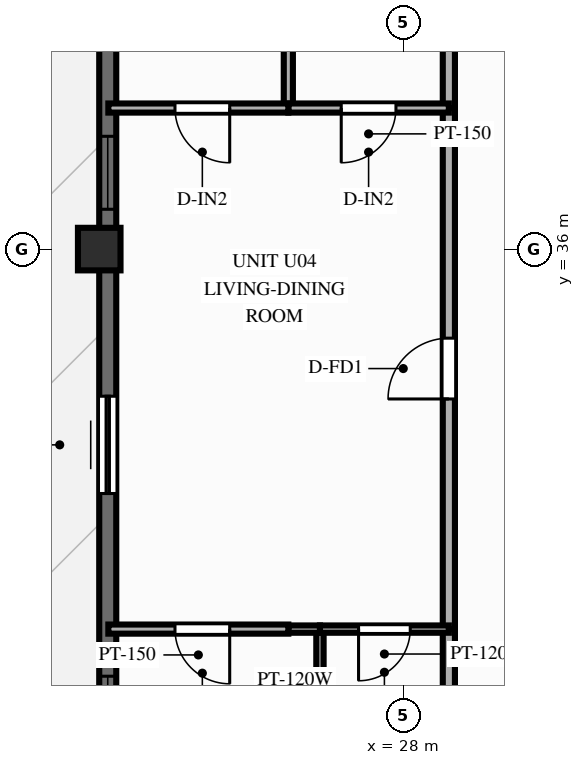
"""IFC4 building model, lengths in metres.
Left out: names, types, materials, properties, quantities, classifications, styles, units other than length and angle.
Written with IfcOpenShell. Run it as: python <this file> out.ifc"""

import sys

from ifc_helpers import new_model, si_unit, direction, frame, frame_2d, origin, origin_2d, place, context, subcontext, project, spatial, rectangle, extrude, source, transform, mapped, element, fill, save


model = new_model("IFC4")
c1 = context("Model", 3, precision=1e-05, world=origin(), true_north=direction((0.0, 1.0)))
c2 = subcontext(c1, "Body", "Model", "MODEL_VIEW")
j1 = project(units=[si_unit("LENGTHUNIT", "METRE"), si_unit("PLANEANGLEUNIT", "RADIAN")], contexts=[c1])
p1 = place(None, origin())
s1 = spatial("IfcSite", under=j1, at=p1, CompositionType="ELEMENT")
p2 = place(p1, origin())
s2 = spatial("IfcBuilding", under=s1, at=p2, CompositionType="ELEMENT")
p3 = place(p2, frame((0.0, 0.0, 240.0)))
s3 = spatial("IfcBuildingStorey", under=s2, at=p3, CompositionType="ELEMENT", Elevation=240.0)
m1 = source(origin(), c2, "Body", "SweptSolid", [
    extrude(rectangle(XDim=0.7, YDim=0.7, at=origin_2d()), origin(), (0.0, 0.0, 1.0), 3.0),
])
p4 = place(p3, frame((23.0, 36.0, 0.0), z_axis=(0.0, 0.0, 1.0), x_axis=(1.0, 0.0, 0.0)))
e1 = element("IfcColumn", 1, at=p4, inside=s3, PredefinedType="COLUMN", context=c2, shape_type="MappedRepresentation", body=[
    mapped(m1, transform((0.0, 0.0, 0.0), scale=1.0)),
])
p5 = place(p3, frame((23.14, 11.5, 0.0), z_axis=(0.0, 0.0, 1.0), x_axis=(0.0, 1.0, 0.0)))
e2 = element("IfcWall", 2, at=p5, inside=s3, PredefinedType="SOLIDWALL", context=c2, shape_type="SweptSolid", body=[
    extrude(rectangle(XDim=31.0, YDim=0.28, at=frame_2d((15.5, 0.0))), origin(), (0.0, 0.0, 1.0), 2.28),
])
p6 = place(p5, frame((1.577, 0.0, 0.25)))
e3 = element("IfcOpeningElement", 3, at=p6, cuts=e2, PredefinedType="OPENING", context=c2, shape_type="SweptSolid", body=[
    extrude(rectangle(XDim=1.2, YDim=1.5, at=frame_2d((0.6, 0.75))), frame((0.0, 0.152, 0.0), z_axis=(0.0, -1.0, 0.0), x_axis=(1.0, 0.0, 0.0)), (0.0, 0.0, 1.0), 0.304),
])
p7 = place(p5, frame((4.637, 0.0, 0.25)))
e4 = element("IfcOpeningElement", 4, at=p7, cuts=e2, PredefinedType="OPENING", context=c2, shape_type="SweptSolid", body=[
    extrude(rectangle(XDim=1.2, YDim=1.5, at=frame_2d((0.6, 0.75))), frame((0.0, 0.152, 0.0), z_axis=(0.0, -1.0, 0.0), x_axis=(1.0, 0.0, 0.0)), (0.0, 0.0, 1.0), 0.304),
])
p8 = place(p5, frame((8.495, 0.0, 0.25)))
e5 = element("IfcOpeningElement", 5, at=p8, cuts=e2, PredefinedType="OPENING", context=c2, shape_type="SweptSolid", body=[
    extrude(rectangle(XDim=1.2, YDim=1.5, at=frame_2d((0.6, 0.75))), frame((0.0, 0.152, 0.0), z_axis=(0.0, -1.0, 0.0), x_axis=(1.0, 0.0, 0.0)), (0.0, 0.0, 1.0), 0.304),
])
p9 = place(p5, frame((12.9, 0.0, 0.25)))
e6 = element("IfcOpeningElement", 6, at=p9, cuts=e2, PredefinedType="OPENING", context=c2, shape_type="SweptSolid", body=[
    extrude(rectangle(XDim=1.2, YDim=1.5, at=frame_2d((0.6, 0.75))), frame((0.0, 0.152, 0.0), z_axis=(0.0, -1.0, 0.0), x_axis=(1.0, 0.0, 0.0)), (0.0, 0.0, 1.0), 0.304),
])
p10 = place(p5, frame((16.275, 0.0, 0.25)))
e7 = element("IfcOpeningElement", 7, at=p10, cuts=e2, PredefinedType="OPENING", context=c2, shape_type="SweptSolid", body=[
    extrude(rectangle(XDim=1.2, YDim=1.5, at=frame_2d((0.6, 0.75))), frame((0.0, 0.152, 0.0), z_axis=(0.0, -1.0, 0.0), x_axis=(1.0, 0.0, 0.0)), (0.0, 0.0, 1.0), 0.304),
])
p11 = place(p5, frame((20.48, 0.0, 0.0)))
e8 = element("IfcOpeningElement", 8, at=p11, cuts=e2, PredefinedType="OPENING", context=c2, shape_type="SweptSolid", body=[
    extrude(rectangle(XDim=1.6, YDim=2.15, at=frame_2d((0.8, 1.075))), frame((0.0, 0.152, 0.0), z_axis=(0.0, -1.0, 0.0), x_axis=(1.0, 0.0, 0.0)), (0.0, 0.0, 1.0), 0.304),
])
p12 = place(p5, frame((25.155, 0.0, 0.25)))
e9 = element("IfcOpeningElement", 9, at=p12, cuts=e2, PredefinedType="OPENING", context=c2, shape_type="SweptSolid", body=[
    extrude(rectangle(XDim=1.2, YDim=1.5, at=frame_2d((0.6, 0.75))), frame((0.0, 0.152, 0.0), z_axis=(0.0, -1.0, 0.0), x_axis=(1.0, 0.0, 0.0)), (0.0, 0.0, 1.0), 0.304),
])
p13 = place(p5, frame((28.215, 0.0, 0.25)))
e10 = element("IfcOpeningElement", 10, at=p13, cuts=e2, PredefinedType="OPENING", context=c2, shape_type="SweptSolid", body=[
    extrude(rectangle(XDim=1.2, YDim=1.5, at=frame_2d((0.6, 0.75))), frame((0.0, 0.152, 0.0), z_axis=(0.0, -1.0, 0.0), x_axis=(1.0, 0.0, 0.0)), (0.0, 0.0, 1.0), 0.304),
])
p14 = place(p3, frame((28.75, 27.0, 0.0), z_axis=(0.0, 0.0, 1.0), x_axis=(0.0, 1.0, 0.0)))
e11 = element("IfcWall", 11, at=p14, inside=s3, PredefinedType="PARTITIONING", context=c2, shape_type="SweptSolid", body=[
    extrude(rectangle(XDim=2.75, YDim=0.2, at=frame_2d((1.375, 0.0))), origin(), (0.0, 0.0, 1.0), 2.79),
])
p15 = place(p3, frame((28.75, 29.75, 0.0), z_axis=(0.0, 0.0, 1.0), x_axis=(0.0, 1.0, 0.0)))
e12 = element("IfcWall", 12, at=p15, inside=s3, PredefinedType="PARTITIONING", context=c2, shape_type="SweptSolid", body=[
    extrude(rectangle(XDim=8.57, YDim=0.2, at=frame_2d((4.285, 0.0))), origin(), (0.0, 0.0, 1.0), 2.79),
])
p16 = place(p15, frame((3.785, 0.0, 0.0)))
e13 = element("IfcOpeningElement", 13, at=p16, cuts=e12, PredefinedType="OPENING", context=c2, shape_type="SweptSolid", body=[
    extrude(rectangle(XDim=1.0, YDim=2.15, at=frame_2d((0.5, 1.075))), frame((0.0, 0.112, 0.0), z_axis=(0.0, -1.0, 0.0), x_axis=(1.0, 0.0, 0.0)), (0.0, 0.0, 1.0), 0.224),
])
p17 = place(p3, frame((28.75, 38.32, 0.0), z_axis=(0.0, 0.0, 1.0), x_axis=(0.0, 1.0, 0.0)))
e14 = element("IfcWall", 14, at=p17, inside=s3, PredefinedType="PARTITIONING", context=c2, shape_type="SweptSolid", body=[
    extrude(rectangle(XDim=4.0, YDim=0.2, at=frame_2d((2.0, 0.0))), origin(), (0.0, 0.0, 1.0), 2.79),
])
p18 = place(p3, frame((26.63, 27.0, 0.0), z_axis=(0.0, 0.0, 1.0), x_axis=(0.0, 1.0, 0.0)))
e15 = element("IfcWall", 15, at=p18, inside=s3, PredefinedType="PARTITIONING", context=c2, shape_type="SweptSolid", body=[
    extrude(rectangle(XDim=2.75, YDim=0.12, at=frame_2d((1.375, 0.0))), origin(), (0.0, 0.0, 1.0), 2.49),
])
p19 = place(p3, frame((26.11, 38.32, 0.0), z_axis=(0.0, 0.0, 1.0), x_axis=(0.0, 1.0, 0.0)))
e16 = element("IfcWall", 16, at=p19, inside=s3, PredefinedType="PARTITIONING", context=c2, shape_type="SweptSolid", body=[
    extrude(rectangle(XDim=4.0, YDim=0.15, at=frame_2d((2.0, 0.0))), origin(), (0.0, 0.0, 1.0), 2.79),
])
p20 = place(p3, frame((28.75, 29.75, 0.0), z_axis=(0.0, 0.0, 1.0), x_axis=(-1.0, 0.0, 0.0)))
e17 = element("IfcWall", 17, at=p20, inside=s3, PredefinedType="PARTITIONING", context=c2, shape_type="SweptSolid", body=[
    extrude(rectangle(XDim=2.12, YDim=0.12, at=frame_2d((1.06, 0.0))), origin(), (0.0, 0.0, 1.0), 2.79),
])
p21 = place(p20, frame((0.635, 0.0, 0.0)))
e18 = element("IfcOpeningElement", 18, at=p21, cuts=e17, PredefinedType="OPENING", context=c2, shape_type="SweptSolid", body=[
    extrude(rectangle(XDim=0.85, YDim=2.05, at=frame_2d((0.425, 1.025))), frame((0.0, 0.072, 0.0), z_axis=(0.0, -1.0, 0.0), x_axis=(1.0, 0.0, 0.0)), (0.0, 0.0, 1.0), 0.144),
])
p22 = place(p3, frame((26.63, 29.75, 0.0), z_axis=(0.0, 0.0, 1.0), x_axis=(-1.0, 0.0, 0.0)))
e19 = element("IfcWall", 19, at=p22, inside=s3, PredefinedType="PARTITIONING", context=c2, shape_type="SweptSolid", body=[
    extrude(rectangle(XDim=0.52, YDim=0.12, at=frame_2d((0.26, 0.0))), origin(), (0.0, 0.0, 1.0), 2.79),
])
p23 = place(p3, frame((26.11, 29.75, 0.0), z_axis=(0.0, 0.0, 1.0), x_axis=(-1.0, 0.0, 0.0)))
e20 = element("IfcWall", 20, at=p23, inside=s3, PredefinedType="PARTITIONING", context=c2, shape_type="SweptSolid", body=[
    extrude(rectangle(XDim=2.96, YDim=0.15, at=frame_2d((1.48, 0.0))), origin(), (0.0, 0.0, 1.0), 2.79),
])
p24 = place(p23, frame((0.964, 0.0, 0.0)))
e21 = element("IfcOpeningElement", 21, at=p24, cuts=e20, PredefinedType="OPENING", context=c2, shape_type="SweptSolid", body=[
    extrude(rectangle(XDim=0.9, YDim=2.1, at=frame_2d((0.45, 1.05))), frame((0.0, 0.087, 0.0), z_axis=(0.0, -1.0, 0.0), x_axis=(1.0, 0.0, 0.0)), (0.0, 0.0, 1.0), 0.174),
])
p25 = place(p3, frame((28.75, 38.32, 0.0), z_axis=(0.0, 0.0, 1.0), x_axis=(-1.0, 0.0, 0.0)))
e22 = element("IfcWall", 22, at=p25, inside=s3, PredefinedType="PARTITIONING", context=c2, shape_type="SweptSolid", body=[
    extrude(rectangle(XDim=2.64, YDim=0.15, at=frame_2d((1.32, 0.0))), origin(), (0.0, 0.0, 1.0), 2.79),
])
p26 = place(p25, frame((0.87, 0.0, 0.0)))
e23 = element("IfcOpeningElement", 23, at=p26, cuts=e22, PredefinedType="OPENING", context=c2, shape_type="SweptSolid", body=[
    extrude(rectangle(XDim=0.9, YDim=2.1, at=frame_2d((0.45, 1.05))), frame((0.0, 0.087, 0.0), z_axis=(0.0, -1.0, 0.0), x_axis=(1.0, 0.0, 0.0)), (0.0, 0.0, 1.0), 0.174),
])
p27 = place(p3, frame((26.11, 38.32, 0.0), z_axis=(0.0, 0.0, 1.0), x_axis=(-1.0, 0.0, 0.0)))
e24 = element("IfcWall", 24, at=p27, inside=s3, PredefinedType="PARTITIONING", context=c2, shape_type="SweptSolid", body=[
    extrude(rectangle(XDim=2.96, YDim=0.15, at=frame_2d((1.48, 0.0))), origin(), (0.0, 0.0, 1.0), 2.79),
])
p28 = place(p27, frame((0.964, 0.0, 0.0)))
e25 = element("IfcOpeningElement", 25, at=p28, cuts=e24, PredefinedType="OPENING", context=c2, shape_type="SweptSolid", body=[
    extrude(rectangle(XDim=0.9, YDim=2.1, at=frame_2d((0.45, 1.05))), frame((0.0, 0.087, 0.0), z_axis=(0.0, -1.0, 0.0), x_axis=(1.0, 0.0, 0.0)), (0.0, 0.0, 1.0), 0.174),
])
m2 = source(origin(), c2, "Body", "SweptSolid", [
    extrude(rectangle(XDim=1.2, YDim=1.5, at=frame_2d((0.6, 0.75))), frame((0.0, 0.03, 0.0), z_axis=(0.0, -1.0, 0.0), x_axis=(1.0, 0.0, 0.0)), (0.0, 0.0, 1.0), 0.06),
])
p29 = place(p10, origin())
e26 = element("IfcWindow", 26, at=p29, inside=s3, PartitioningType="SINGLE_PANEL", PredefinedType="WINDOW", context=c2, shape_type="MappedRepresentation", body=[
    mapped(m2, transform((0.0, 0.0, 0.0), scale=1.0)),
])
fill(e7, e26)
m3 = source(origin(), c2, "Body", "SweptSolid", [
    extrude(rectangle(XDim=1.6, YDim=2.15, at=frame_2d((0.8, 1.075))), frame((0.0, 0.025, 0.0), z_axis=(0.0, -1.0, 0.0), x_axis=(1.0, 0.0, 0.0)), (0.0, 0.0, 1.0), 0.05),
])
p30 = place(p11, origin())
e27 = element("IfcDoor", 27, at=p30, inside=s3, OperationType="SLIDING_TO_LEFT", PredefinedType="DOOR", context=c2, shape_type="MappedRepresentation", body=[
    mapped(m3, transform((0.0, 0.0, 0.0), scale=1.0)),
])
fill(e8, e27)
p31 = place(p12, origin())
e28 = element("IfcWindow", 28, at=p31, inside=s3, PartitioningType="SINGLE_PANEL", PredefinedType="WINDOW", context=c2, shape_type="MappedRepresentation", body=[
    mapped(m2, transform((0.0, 0.0, 0.0), scale=1.0)),
])
fill(e9, e28)
m4 = source(origin(), c2, "Body", "SweptSolid", [
    extrude(rectangle(XDim=1.0, YDim=2.15, at=frame_2d((0.5, 1.075))), frame((0.0, 0.025, 0.0), z_axis=(0.0, -1.0, 0.0), x_axis=(1.0, 0.0, 0.0)), (0.0, 0.0, 1.0), 0.05),
])
p32 = place(p16, origin())
e29 = element("IfcDoor", 29, at=p32, inside=s3, OperationType="SINGLE_SWING_LEFT", PredefinedType="DOOR", context=c2, shape_type="MappedRepresentation", body=[
    mapped(m4, transform((0.0, 0.0, 0.0), scale=1.0)),
])
fill(e13, e29)
m5 = source(origin(), c2, "Body", "SweptSolid", [
    extrude(rectangle(XDim=0.85, YDim=2.05, at=frame_2d((0.425, 1.025))), frame((0.0, 0.025, 0.0), z_axis=(0.0, -1.0, 0.0), x_axis=(1.0, 0.0, 0.0)), (0.0, 0.0, 1.0), 0.05),
])
p33 = place(p21, origin())
e30 = element("IfcDoor", 30, at=p33, inside=s3, OperationType="SINGLE_SWING_RIGHT", PredefinedType="DOOR", context=c2, shape_type="MappedRepresentation", body=[
    mapped(m5, transform((0.0, 0.0, 0.0), scale=1.0)),
])
fill(e18, e30)
m6 = source(origin(), c2, "Body", "SweptSolid", [
    extrude(rectangle(XDim=0.9, YDim=2.1, at=frame_2d((0.45, 1.05))), frame((0.0, 0.025, 0.0), z_axis=(0.0, -1.0, 0.0), x_axis=(1.0, 0.0, 0.0)), (0.0, 0.0, 1.0), 0.05),
])
p34 = place(p24, origin())
e31 = element("IfcDoor", 31, at=p34, inside=s3, OperationType="SINGLE_SWING_LEFT", PredefinedType="DOOR", context=c2, shape_type="MappedRepresentation", body=[
    mapped(m6, transform((0.0, 0.0, 0.0), scale=1.0)),
])
fill(e21, e31)
p35 = place(p26, origin())
e32 = element("IfcDoor", 32, at=p35, inside=s3, OperationType="SINGLE_SWING_RIGHT", PredefinedType="DOOR", context=c2, shape_type="MappedRepresentation", body=[
    mapped(m6, transform((0.0, 0.0, 0.0), scale=1.0)),
])
fill(e23, e32)
p36 = place(p28, origin())
e33 = element("IfcDoor", 33, at=p36, inside=s3, OperationType="SINGLE_SWING_LEFT", PredefinedType="DOOR", context=c2, shape_type="MappedRepresentation", body=[
    mapped(m6, transform((0.0, 0.0, 0.0), scale=1.0)),
])
fill(e25, e33)
save(model, sys.argv[1])
